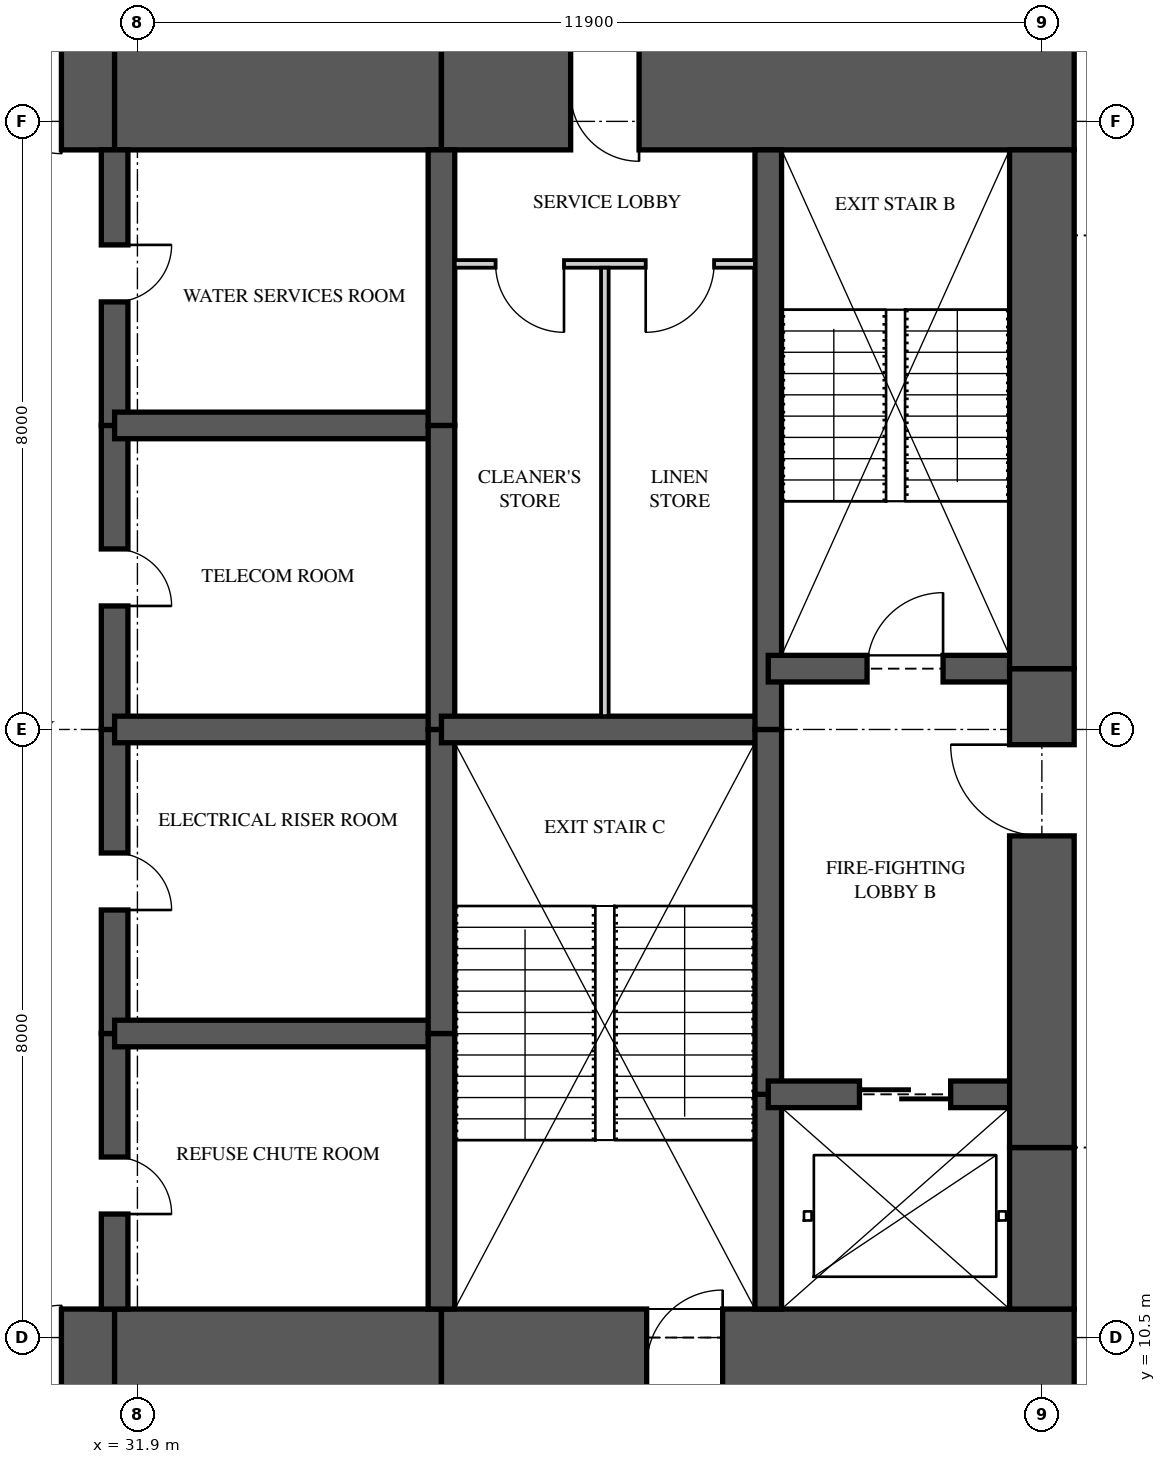
"""IFC4 building model, lengths in metres.
Left out: names, types, materials, properties, quantities, classifications, styles, units other than length and angle.
Written with IfcOpenShell. Run it as: python <this file> out.ifc"""

import sys

from ifc_helpers import new_model, si_unit, direction, frame, frame_2d, origin, place, context, subcontext, project, spatial, rectangle, extrude, element, fill, save


model = new_model("IFC4")
c1 = context("Model", 3, precision=1e-05, world=origin(), true_north=direction((0.0, 1.0)))
c2 = subcontext(c1, "Body", "Model", "MODEL_VIEW")
j1 = project(units=[si_unit("LENGTHUNIT", "METRE"), si_unit("PLANEANGLEUNIT", "RADIAN")], contexts=[c1])
p1 = place(None, origin())
s1 = spatial("IfcSite", under=j1, at=p1, CompositionType="ELEMENT")
p2 = place(p1, origin())
s2 = spatial("IfcBuilding", under=s1, at=p2, CompositionType="ELEMENT")
p3 = place(p2, frame((0.0, 0.0, 94.8)))
s3 = spatial("IfcBuildingStorey", under=s2, at=p3, CompositionType="ELEMENT", Elevation=94.8)
p4 = place(p3, frame((26.0, 10.125, 0.0), z_axis=(0.0, 0.0, 1.0), x_axis=(1.0, 0.0, 0.0)))
e1 = element("IfcWall", 1, at=p4, inside=s3, PredefinedType="SHEAR", context=c2, shape_type="SweptSolid", body=[
    extrude(rectangle(XDim=5.6, YDim=1.5, at=frame_2d((2.8, 0.0))), origin(), (0.0, 0.0, 1.0), 3.35),
])
p5 = place(p4, frame((3.3, 0.0, 0.0)))
e2 = element("IfcOpeningElement", 2, at=p5, cuts=e1, PredefinedType="OPENING", context=c2, shape_type="SweptSolid", body=[
    extrude(rectangle(XDim=1.6, YDim=2.1, at=frame_2d((0.8, 1.05))), frame((0.0, 0.76, 0.0), z_axis=(0.0, -1.0, 0.0), x_axis=(1.0, 0.0, 0.0)), (0.0, 0.0, 1.0), 1.52),
])
p6 = place(p3, frame((31.6, 10.125, 0.0), z_axis=(0.0, 0.0, 1.0), x_axis=(1.0, 0.0, 0.0)))
e3 = element("IfcWall", 3, at=p6, inside=s3, PredefinedType="SHEAR", context=c2, shape_type="SweptSolid", body=[
    extrude(rectangle(XDim=4.3, YDim=1.5, at=frame_2d((2.15, 0.0))), origin(), (0.0, 0.0, 1.0), 3.35),
])
p7 = place(p3, frame((35.9, 10.125, 0.0), z_axis=(0.0, 0.0, 1.0), x_axis=(1.0, 0.0, 0.0)))
e4 = element("IfcWall", 4, at=p7, inside=s3, PredefinedType="SHEAR", context=c2, shape_type="SweptSolid", body=[
    extrude(rectangle(XDim=8.325, YDim=1.5, at=frame_2d((4.163, 0.0))), origin(), (0.0, 0.0, 1.0), 3.35),
])
p8 = place(p7, frame((2.7, 0.0, 0.0)))
e5 = element("IfcOpeningElement", 5, at=p8, cuts=e4, PredefinedType="OPENING", context=c2, shape_type="SweptSolid", body=[
    extrude(rectangle(XDim=1.0, YDim=2.1, at=frame_2d((0.5, 1.05))), frame((0.0, 0.76, 0.0), z_axis=(0.0, -1.0, 0.0), x_axis=(1.0, 0.0, 0.0)), (0.0, 0.0, 1.0), 1.52),
])
p9 = place(p3, frame((44.225, 26.875, 0.0), z_axis=(0.0, 0.0, 1.0), x_axis=(-1.0, 0.0, 0.0)))
e6 = element("IfcWall", 6, at=p9, inside=s3, PredefinedType="SHEAR", context=c2, shape_type="SweptSolid", body=[
    extrude(rectangle(XDim=8.325, YDim=1.5, at=frame_2d((4.163, 0.0))), origin(), (0.0, 0.0, 1.0), 3.35),
])
p10 = place(p9, frame((5.725, 0.0, 0.0)))
e7 = element("IfcOpeningElement", 7, at=p10, cuts=e6, PredefinedType="OPENING", context=c2, shape_type="SweptSolid", body=[
    extrude(rectangle(XDim=0.9, YDim=2.1, at=frame_2d((0.45, 1.05))), frame((0.0, 0.76, 0.0), z_axis=(0.0, -1.0, 0.0), x_axis=(1.0, 0.0, 0.0)), (0.0, 0.0, 1.0), 1.52),
])
p11 = place(p3, frame((35.9, 26.875, 0.0), z_axis=(0.0, 0.0, 1.0), x_axis=(-1.0, 0.0, 0.0)))
e8 = element("IfcWall", 8, at=p11, inside=s3, PredefinedType="SHEAR", context=c2, shape_type="SweptSolid", body=[
    extrude(rectangle(XDim=4.3, YDim=1.5, at=frame_2d((2.15, 0.0))), origin(), (0.0, 0.0, 1.0), 3.35),
])
p12 = place(p3, frame((31.6, 26.875, 0.0), z_axis=(0.0, 0.0, 1.0), x_axis=(-1.0, 0.0, 0.0)))
e9 = element("IfcWall", 9, at=p12, inside=s3, PredefinedType="SHEAR", context=c2, shape_type="SweptSolid", body=[
    extrude(rectangle(XDim=5.6, YDim=1.5, at=frame_2d((2.8, 0.0))), origin(), (0.0, 0.0, 1.0), 3.35),
])
p13 = place(p12, frame((0.7, 0.0, 0.0)))
e10 = element("IfcOpeningElement", 10, at=p13, cuts=e9, PredefinedType="OPENING", context=c2, shape_type="SweptSolid", body=[
    extrude(rectangle(XDim=1.6, YDim=2.1, at=frame_2d((0.8, 1.05))), frame((0.0, 0.76, 0.0), z_axis=(0.0, -1.0, 0.0), x_axis=(1.0, 0.0, 0.0)), (0.0, 0.0, 1.0), 1.52),
])
p14 = place(p3, frame((43.8, 10.875, 0.0), z_axis=(0.0, 0.0, 1.0), x_axis=(0.0, 1.0, 0.0)))
e11 = element("IfcWall", 11, at=p14, inside=s3, PredefinedType="SHEAR", context=c2, shape_type="SweptSolid", body=[
    extrude(rectangle(XDim=2.125, YDim=0.85, at=frame_2d((1.062, 0.0))), origin(), (0.0, 0.0, 1.0), 3.35),
])
p15 = place(p3, frame((43.8, 13.0, 0.0), z_axis=(0.0, 0.0, 1.0), x_axis=(0.0, 1.0, 0.0)))
e12 = element("IfcWall", 12, at=p15, inside=s3, PredefinedType="SHEAR", context=c2, shape_type="SweptSolid", body=[
    extrude(rectangle(XDim=6.3, YDim=0.85, at=frame_2d((3.15, 0.0))), origin(), (0.0, 0.0, 1.0), 3.35),
])
p16 = place(p15, frame((4.1, 0.0, 0.0)))
e13 = element("IfcOpeningElement", 13, at=p16, cuts=e12, PredefinedType="OPENING", context=c2, shape_type="SweptSolid", body=[
    extrude(rectangle(XDim=1.2, YDim=2.2, at=frame_2d((0.6, 1.1))), frame((0.0, 0.435, 0.0), z_axis=(0.0, -1.0, 0.0), x_axis=(1.0, 0.0, 0.0)), (0.0, 0.0, 1.0), 0.87),
])
p17 = place(p3, frame((43.8, 19.3, 0.0), z_axis=(0.0, 0.0, 1.0), x_axis=(0.0, 1.0, 0.0)))
e14 = element("IfcWall", 14, at=p17, inside=s3, PredefinedType="SHEAR", context=c2, shape_type="SweptSolid", body=[
    extrude(rectangle(XDim=6.825, YDim=0.85, at=frame_2d((3.413, 0.0))), origin(), (0.0, 0.0, 1.0), 3.35),
])
p18 = place(p3, frame((31.6, 10.875, 0.0), z_axis=(0.0, 0.0, 1.0), x_axis=(0.0, 1.0, 0.0)))
e15 = element("IfcWall", 15, at=p18, inside=s3, PredefinedType="SHEAR", context=c2, shape_type="SweptSolid", body=[
    extrude(rectangle(XDim=3.625, YDim=0.35, at=frame_2d((1.812, 0.0))), origin(), (0.0, 0.0, 1.0), 3.35),
])
p19 = place(p18, frame((1.25, 0.0, 0.0)))
e16 = element("IfcOpeningElement", 16, at=p19, cuts=e15, PredefinedType="OPENING", context=c2, shape_type="SweptSolid", body=[
    extrude(rectangle(XDim=0.75, YDim=2.1, at=frame_2d((0.375, 1.05))), frame((0.0, 0.185, 0.0), z_axis=(0.0, -1.0, 0.0), x_axis=(1.0, 0.0, 0.0)), (0.0, 0.0, 1.0), 0.37),
])
p20 = place(p3, frame((31.6, 14.5, 0.0), z_axis=(0.0, 0.0, 1.0), x_axis=(0.0, 1.0, 0.0)))
e17 = element("IfcWall", 17, at=p20, inside=s3, PredefinedType="SHEAR", context=c2, shape_type="SweptSolid", body=[
    extrude(rectangle(XDim=4.0, YDim=0.35, at=frame_2d((2.0, 0.0))), origin(), (0.0, 0.0, 1.0), 3.35),
])
p21 = place(p20, frame((1.625, 0.0, 0.0)))
e18 = element("IfcOpeningElement", 18, at=p21, cuts=e17, PredefinedType="OPENING", context=c2, shape_type="SweptSolid", body=[
    extrude(rectangle(XDim=0.75, YDim=2.1, at=frame_2d((0.375, 1.05))), frame((0.0, 0.185, 0.0), z_axis=(0.0, -1.0, 0.0), x_axis=(1.0, 0.0, 0.0)), (0.0, 0.0, 1.0), 0.37),
])
p22 = place(p3, frame((31.6, 18.5, 0.0), z_axis=(0.0, 0.0, 1.0), x_axis=(0.0, 1.0, 0.0)))
e19 = element("IfcWall", 19, at=p22, inside=s3, PredefinedType="SHEAR", context=c2, shape_type="SweptSolid", body=[
    extrude(rectangle(XDim=4.0, YDim=0.35, at=frame_2d((2.0, 0.0))), origin(), (0.0, 0.0, 1.0), 3.35),
])
p23 = place(p22, frame((1.625, 0.0, 0.0)))
e20 = element("IfcOpeningElement", 20, at=p23, cuts=e19, PredefinedType="OPENING", context=c2, shape_type="SweptSolid", body=[
    extrude(rectangle(XDim=0.75, YDim=2.1, at=frame_2d((0.375, 1.05))), frame((0.0, 0.185, 0.0), z_axis=(0.0, -1.0, 0.0), x_axis=(1.0, 0.0, 0.0)), (0.0, 0.0, 1.0), 0.37),
])
p24 = place(p3, frame((31.6, 22.5, 0.0), z_axis=(0.0, 0.0, 1.0), x_axis=(0.0, 1.0, 0.0)))
e21 = element("IfcWall", 21, at=p24, inside=s3, PredefinedType="SHEAR", context=c2, shape_type="SweptSolid", body=[
    extrude(rectangle(XDim=3.625, YDim=0.35, at=frame_2d((1.812, 0.0))), origin(), (0.0, 0.0, 1.0), 3.35),
])
p25 = place(p24, frame((1.625, 0.0, 0.0)))
e22 = element("IfcOpeningElement", 22, at=p25, cuts=e21, PredefinedType="OPENING", context=c2, shape_type="SweptSolid", body=[
    extrude(rectangle(XDim=0.75, YDim=2.1, at=frame_2d((0.375, 1.05))), frame((0.0, 0.185, 0.0), z_axis=(0.0, -1.0, 0.0), x_axis=(1.0, 0.0, 0.0)), (0.0, 0.0, 1.0), 0.37),
])
p26 = place(p3, frame((35.9, 10.875, 0.0), z_axis=(0.0, 0.0, 1.0), x_axis=(0.0, 1.0, 0.0)))
e23 = element("IfcWall", 23, at=p26, inside=s3, PredefinedType="SHEAR", context=c2, shape_type="SweptSolid", body=[
    extrude(rectangle(XDim=3.625, YDim=0.35, at=frame_2d((1.812, 0.0))), origin(), (0.0, 0.0, 1.0), 3.35),
])
for number, where, z_axis, x_axis in (
    (24, (35.9, 14.5, 0.0), (0.0, 0.0, 1.0), (0.0, 1.0, 0.0)),
    (25, (35.9, 18.5, 0.0), (0.0, 0.0, 1.0), (0.0, 1.0, 0.0)),
):
    element("IfcWall", number, at=place(p3, frame(where, z_axis=z_axis, x_axis=x_axis)), inside=s3, PredefinedType="SHEAR", context=c2, shape_type="SweptSolid", body=[
        extrude(rectangle(XDim=4.0, YDim=0.35, at=frame_2d((2.0, 0.0))), origin(), (0.0, 0.0, 1.0), 3.35),
    ])
p27 = place(p3, frame((35.9, 22.5, 0.0), z_axis=(0.0, 0.0, 1.0), x_axis=(0.0, 1.0, 0.0)))
e26 = element("IfcWall", 26, at=p27, inside=s3, PredefinedType="SHEAR", context=c2, shape_type="SweptSolid", body=[
    extrude(rectangle(XDim=3.625, YDim=0.35, at=frame_2d((1.812, 0.0))), origin(), (0.0, 0.0, 1.0), 3.35),
])
p28 = place(p3, frame((40.2, 10.875, 0.0), z_axis=(0.0, 0.0, 1.0), x_axis=(0.0, 1.0, 0.0)))
e27 = element("IfcWall", 27, at=p28, inside=s3, PredefinedType="SHEAR", context=c2, shape_type="SweptSolid", body=[
    extrude(rectangle(XDim=2.825, YDim=0.35, at=frame_2d((1.413, 0.0))), origin(), (0.0, 0.0, 1.0), 3.35),
])
p29 = place(p3, frame((40.2, 13.7, 0.0), z_axis=(0.0, 0.0, 1.0), x_axis=(0.0, 1.0, 0.0)))
e28 = element("IfcWall", 28, at=p29, inside=s3, PredefinedType="SHEAR", context=c2, shape_type="SweptSolid", body=[
    extrude(rectangle(XDim=4.8, YDim=0.35, at=frame_2d((2.4, 0.0))), origin(), (0.0, 0.0, 1.0), 3.35),
])
p30 = place(p3, frame((40.2, 18.5, 0.0), z_axis=(0.0, 0.0, 1.0), x_axis=(0.0, 1.0, 0.0)))
e29 = element("IfcWall", 29, at=p30, inside=s3, PredefinedType="SHEAR", context=c2, shape_type="SweptSolid", body=[
    extrude(rectangle(XDim=7.625, YDim=0.35, at=frame_2d((3.812, 0.0))), origin(), (0.0, 0.0, 1.0), 3.35),
])
for number, where, z_axis, x_axis in (
    (30, (31.6, 14.5, 0.0), (0.0, 0.0, 1.0), (1.0, 0.0, 0.0)),
    (31, (31.6, 18.5, 0.0), (0.0, 0.0, 1.0), (1.0, 0.0, 0.0)),
    (32, (31.6, 22.5, 0.0), (0.0, 0.0, 1.0), (1.0, 0.0, 0.0)),
):
    element("IfcWall", number, at=place(p3, frame(where, z_axis=z_axis, x_axis=x_axis)), inside=s3, PredefinedType="SHEAR", context=c2, shape_type="SweptSolid", body=[
        extrude(rectangle(XDim=4.3, YDim=0.35, at=frame_2d((2.15, 0.0))), origin(), (0.0, 0.0, 1.0), 3.35),
    ])
p31 = place(p3, frame((35.9, 18.5, 0.0), z_axis=(0.0, 0.0, 1.0), x_axis=(1.0, 0.0, 0.0)))
e33 = element("IfcWall", 33, at=p31, inside=s3, PredefinedType="SHEAR", context=c2, shape_type="SweptSolid", body=[
    extrude(rectangle(XDim=4.3, YDim=0.35, at=frame_2d((2.15, 0.0))), origin(), (0.0, 0.0, 1.0), 3.35),
])
p32 = place(p3, frame((40.2, 13.7, 0.0), z_axis=(0.0, 0.0, 1.0), x_axis=(1.0, 0.0, 0.0)))
e34 = element("IfcWall", 34, at=p32, inside=s3, PredefinedType="SHEAR", context=c2, shape_type="SweptSolid", body=[
    extrude(rectangle(XDim=3.6, YDim=0.35, at=frame_2d((1.8, 0.0))), origin(), (0.0, 0.0, 1.0), 3.35),
])
p33 = place(p32, frame((1.2, 0.0, 0.0)))
e35 = element("IfcOpeningElement", 35, at=p33, cuts=e34, PredefinedType="OPENING", context=c2, shape_type="SweptSolid", body=[
    extrude(rectangle(XDim=1.2, YDim=2.1, at=frame_2d((0.6, 1.05))), frame((0.0, 0.185, 0.0), z_axis=(0.0, -1.0, 0.0), x_axis=(1.0, 0.0, 0.0)), (0.0, 0.0, 1.0), 0.37),
])
p34 = place(p3, frame((40.2, 19.3, 0.0), z_axis=(0.0, 0.0, 1.0), x_axis=(1.0, 0.0, 0.0)))
e36 = element("IfcWall", 36, at=p34, inside=s3, PredefinedType="SHEAR", context=c2, shape_type="SweptSolid", body=[
    extrude(rectangle(XDim=3.6, YDim=0.35, at=frame_2d((1.8, 0.0))), origin(), (0.0, 0.0, 1.0), 3.35),
])
p35 = place(p34, frame((1.3, 0.0, 0.0)))
e37 = element("IfcOpeningElement", 37, at=p35, cuts=e36, PredefinedType="OPENING", context=c2, shape_type="SweptSolid", body=[
    extrude(rectangle(XDim=1.0, YDim=2.1, at=frame_2d((0.5, 1.05))), frame((0.0, 0.185, 0.0), z_axis=(0.0, -1.0, 0.0), x_axis=(1.0, 0.0, 0.0)), (0.0, 0.0, 1.0), 0.37),
])
p36 = place(p3, frame((36.075, 24.625, 0.0), z_axis=(0.0, 0.0, 1.0), x_axis=(1.0, 0.0, 0.0)))
e38 = element("IfcWall", 38, at=p36, inside=s3, PredefinedType="PARTITIONING", context=c2, shape_type="SweptSolid", body=[
    extrude(rectangle(XDim=3.95, YDim=0.1, at=frame_2d((1.975, 0.0))), origin(), (0.0, 0.0, 1.0), 3.11),
])
p37 = place(p36, frame((0.538, 0.0, 0.0)))
e39 = element("IfcOpeningElement", 39, at=p37, cuts=e38, PredefinedType="OPENING", context=c2, shape_type="SweptSolid", body=[
    extrude(rectangle(XDim=0.9, YDim=2.1, at=frame_2d((0.45, 1.05))), frame((0.0, 0.06, 0.0), z_axis=(0.0, -1.0, 0.0), x_axis=(1.0, 0.0, 0.0)), (0.0, 0.0, 1.0), 0.12),
])
p38 = place(p36, frame((2.512, 0.0, 0.0)))
e40 = element("IfcOpeningElement", 40, at=p38, cuts=e38, PredefinedType="OPENING", context=c2, shape_type="SweptSolid", body=[
    extrude(rectangle(XDim=0.9, YDim=2.1, at=frame_2d((0.45, 1.05))), frame((0.0, 0.06, 0.0), z_axis=(0.0, -1.0, 0.0), x_axis=(1.0, 0.0, 0.0)), (0.0, 0.0, 1.0), 0.12),
])
p39 = place(p3, frame((38.05, 18.675, 0.0), z_axis=(0.0, 0.0, 1.0), x_axis=(0.0, 1.0, 0.0)))
e41 = element("IfcWall", 41, at=p39, inside=s3, PredefinedType="PARTITIONING", context=c2, shape_type="SweptSolid", body=[
    extrude(rectangle(XDim=5.9, YDim=0.1, at=frame_2d((2.95, 0.0))), origin(), (0.0, 0.0, 1.0), 3.11),
])
p40 = place(p37, frame((0.9, 0.0, 0.0), z_axis=(0.0, 0.0, 1.0), x_axis=(-1.0, 0.0, 0.0)))
e42 = element("IfcDoor", 42, at=p40, inside=s3, OperationType="SINGLE_SWING_LEFT", PredefinedType="DOOR", context=c2, shape_type="SweptSolid", body=[
    extrude(rectangle(XDim=0.9, YDim=2.1, at=frame_2d((0.45, 1.05))), frame((0.0, 0.025, 0.0), z_axis=(0.0, -1.0, 0.0), x_axis=(1.0, 0.0, 0.0)), (0.0, 0.0, 1.0), 0.05),
])
fill(e39, e42)
p41 = place(p38, frame((0.9, 0.0, 0.0), z_axis=(0.0, 0.0, 1.0), x_axis=(-1.0, 0.0, 0.0)))
e43 = element("IfcDoor", 43, at=p41, inside=s3, OperationType="SINGLE_SWING_RIGHT", PredefinedType="DOOR", context=c2, shape_type="SweptSolid", body=[
    extrude(rectangle(XDim=0.9, YDim=2.1, at=frame_2d((0.45, 1.05))), frame((0.0, 0.025, 0.0), z_axis=(0.0, -1.0, 0.0), x_axis=(1.0, 0.0, 0.0)), (0.0, 0.0, 1.0), 0.05),
])
fill(e40, e43)
p42 = place(p35, origin())
e44 = element("IfcDoor", 44, at=p42, inside=s3, OperationType="SINGLE_SWING_RIGHT", PredefinedType="DOOR", context=c2, shape_type="SweptSolid", body=[
    extrude(rectangle(XDim=1.0, YDim=2.1, at=frame_2d((0.5, 1.05))), frame((0.0, 0.025, 0.0), z_axis=(0.0, -1.0, 0.0), x_axis=(1.0, 0.0, 0.0)), (0.0, 0.0, 1.0), 0.05),
])
fill(e37, e44)
p43 = place(p16, origin())
e45 = element("IfcDoor", 45, at=p43, inside=s3, OperationType="SINGLE_SWING_RIGHT", PredefinedType="DOOR", context=c2, shape_type="SweptSolid", body=[
    extrude(rectangle(XDim=1.2, YDim=2.2, at=frame_2d((0.6, 1.1))), frame((0.0, 0.025, 0.0), z_axis=(0.0, -1.0, 0.0), x_axis=(1.0, 0.0, 0.0)), (0.0, 0.0, 1.0), 0.05),
])
fill(e13, e45)
p44 = place(p33, origin())
e46 = element("IfcDoor", 46, at=p44, inside=s3, OperationType="SLIDING_TO_LEFT", PredefinedType="DOOR", context=c2, shape_type="SweptSolid", body=[
    extrude(rectangle(XDim=1.2, YDim=2.1, at=frame_2d((0.6, 1.05))), frame((0.0, 0.025, 0.0), z_axis=(0.0, -1.0, 0.0), x_axis=(1.0, 0.0, 0.0)), (0.0, 0.0, 1.0), 0.05),
])
fill(e35, e46)
p45 = place(p5, origin())
e47 = element("IfcDoor", 47, at=p45, inside=s3, OperationType="DOUBLE_DOOR_SINGLE_SWING", PredefinedType="DOOR", context=c2, shape_type="SweptSolid", body=[
    extrude(rectangle(XDim=1.6, YDim=2.1, at=frame_2d((0.8, 1.05))), frame((0.0, 0.025, 0.0), z_axis=(0.0, -1.0, 0.0), x_axis=(1.0, 0.0, 0.0)), (0.0, 0.0, 1.0), 0.05),
])
fill(e2, e47)
p46 = place(p13, origin())
e48 = element("IfcDoor", 48, at=p46, inside=s3, OperationType="DOUBLE_DOOR_SINGLE_SWING", PredefinedType="DOOR", context=c2, shape_type="SweptSolid", body=[
    extrude(rectangle(XDim=1.6, YDim=2.1, at=frame_2d((0.8, 1.05))), frame((0.0, 0.025, 0.0), z_axis=(0.0, -1.0, 0.0), x_axis=(1.0, 0.0, 0.0)), (0.0, 0.0, 1.0), 0.05),
])
fill(e10, e48)
p47 = place(p19, frame((0.75, 0.0, 0.0), z_axis=(0.0, 0.0, 1.0), x_axis=(-1.0, 0.0, 0.0)))
e49 = element("IfcDoor", 49, at=p47, inside=s3, OperationType="SINGLE_SWING_RIGHT", PredefinedType="DOOR", context=c2, shape_type="SweptSolid", body=[
    extrude(rectangle(XDim=0.75, YDim=2.1, at=frame_2d((0.375, 1.05))), frame((0.0, 0.025, 0.0), z_axis=(0.0, -1.0, 0.0), x_axis=(1.0, 0.0, 0.0)), (0.0, 0.0, 1.0), 0.05),
])
fill(e16, e49)
p48 = place(p21, frame((0.75, 0.0, 0.0), z_axis=(0.0, 0.0, 1.0), x_axis=(-1.0, 0.0, 0.0)))
e50 = element("IfcDoor", 50, at=p48, inside=s3, OperationType="SINGLE_SWING_RIGHT", PredefinedType="DOOR", context=c2, shape_type="SweptSolid", body=[
    extrude(rectangle(XDim=0.75, YDim=2.1, at=frame_2d((0.375, 1.05))), frame((0.0, 0.025, 0.0), z_axis=(0.0, -1.0, 0.0), x_axis=(1.0, 0.0, 0.0)), (0.0, 0.0, 1.0), 0.05),
])
fill(e18, e50)
p49 = place(p23, frame((0.75, 0.0, 0.0), z_axis=(0.0, 0.0, 1.0), x_axis=(-1.0, 0.0, 0.0)))
e51 = element("IfcDoor", 51, at=p49, inside=s3, OperationType="SINGLE_SWING_RIGHT", PredefinedType="DOOR", context=c2, shape_type="SweptSolid", body=[
    extrude(rectangle(XDim=0.75, YDim=2.1, at=frame_2d((0.375, 1.05))), frame((0.0, 0.025, 0.0), z_axis=(0.0, -1.0, 0.0), x_axis=(1.0, 0.0, 0.0)), (0.0, 0.0, 1.0), 0.05),
])
fill(e20, e51)
p50 = place(p25, frame((0.75, 0.0, 0.0), z_axis=(0.0, 0.0, 1.0), x_axis=(-1.0, 0.0, 0.0)))
e52 = element("IfcDoor", 52, at=p50, inside=s3, OperationType="SINGLE_SWING_LEFT", PredefinedType="DOOR", context=c2, shape_type="SweptSolid", body=[
    extrude(rectangle(XDim=0.75, YDim=2.1, at=frame_2d((0.375, 1.05))), frame((0.0, 0.025, 0.0), z_axis=(0.0, -1.0, 0.0), x_axis=(1.0, 0.0, 0.0)), (0.0, 0.0, 1.0), 0.05),
])
fill(e22, e52)
p51 = place(p8, origin())
e53 = element("IfcDoor", 53, at=p51, inside=s3, OperationType="SINGLE_SWING_RIGHT", PredefinedType="DOOR", context=c2, shape_type="SweptSolid", body=[
    extrude(rectangle(XDim=1.0, YDim=2.1, at=frame_2d((0.5, 1.05))), frame((0.0, 0.025, 0.0), z_axis=(0.0, -1.0, 0.0), x_axis=(1.0, 0.0, 0.0)), (0.0, 0.0, 1.0), 0.05),
])
fill(e5, e53)
p52 = place(p10, origin())
e54 = element("IfcDoor", 54, at=p52, inside=s3, OperationType="SINGLE_SWING_LEFT", PredefinedType="DOOR", context=c2, shape_type="SweptSolid", body=[
    extrude(rectangle(XDim=0.9, YDim=2.1, at=frame_2d((0.45, 1.05))), frame((0.0, 0.47, 0.0), z_axis=(0.0, -1.0, 0.0), x_axis=(1.0, 0.0, 0.0)), (0.0, 0.0, 1.0), 0.8),
])
fill(e7, e54)
save(model, sys.argv[1])
